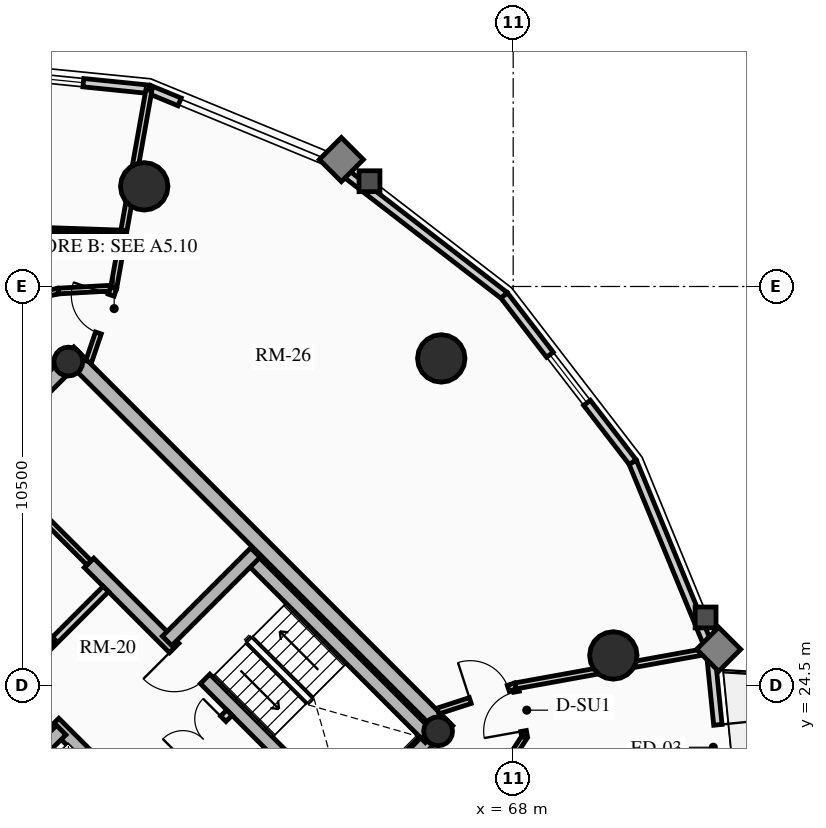
"""IFC4 building model, lengths in metres.
Left out: names, types, materials, properties, quantities, classifications, styles, units other than length and angle.
Written with IfcOpenShell. Run it as: python <this file> out.ifc"""

import sys

from ifc_helpers import new_model, si_unit, direction, frame, frame_2d, origin, origin_2d, place, context, subcontext, project, spatial, rectangle, circle, hollow_circle, extrude, source, transform, mapped, element, fill, save


model = new_model("IFC4")
c1 = context("Model", 3, precision=1e-05, world=origin(), true_north=direction((0.0, 1.0)))
c2 = subcontext(c1, "Body", "Model", "MODEL_VIEW")
j1 = project(units=[si_unit("LENGTHUNIT", "METRE"), si_unit("PLANEANGLEUNIT", "RADIAN")], contexts=[c1])
p1 = place(None, origin())
s1 = spatial("IfcSite", under=j1, at=p1, CompositionType="ELEMENT")
p2 = place(p1, origin())
s2 = spatial("IfcBuilding", under=s1, at=p2, CompositionType="ELEMENT")
p3 = place(p2, frame((0.0, 0.0, 160.33)))
s3 = spatial("IfcBuildingStorey", under=s2, at=p3, CompositionType="ELEMENT", Elevation=160.33)
for number, where, z_axis, x_axis in (
    (1, (58.702, 15.732, 0.0), (0.0, 0.0, 1.0), (-0.707, 0.707, 0.0)),
    (2, (66.268, 23.298, 0.0), (0.0, 0.0, 1.0), (-0.707, 0.707, 0.0)),
):
    element("IfcWall", number, at=place(p3, frame(where, z_axis=z_axis, x_axis=x_axis)), inside=s3, PredefinedType="SHEAR", context=c2, shape_type="SweptSolid", body=[
        extrude(rectangle(XDim=14.1, YDim=0.4, at=frame_2d((7.05, 0.0))), origin(), (0.0, 0.0, 1.0), 2.91),
    ])
p4 = place(p3, frame((58.561, 15.873, 0.0), z_axis=(0.0, 0.0, 1.0), x_axis=(0.707106781187, 0.707106781187, 0.0)))
e3 = element("IfcWall", 3, at=p4, inside=s3, PredefinedType="SHEAR", context=c2, shape_type="SweptSolid", body=[
    extrude(rectangle(XDim=10.7, YDim=0.4, at=frame_2d((5.35, 0.0))), origin(), (0.0, 0.0, 1.0), 2.91),
])
m1 = source(origin(), c2, "Body", "SweptSolid", [
    extrude(rectangle(XDim=1.5, YDim=2.02, at=frame_2d((0.75, 1.01))), frame((0.0, 0.21, 0.0), z_axis=(0.0, -1.0, 0.0), x_axis=(1.0, 0.0, 0.0)), (0.0, 0.0, 1.0), 0.42),
])
p5 = place(p4, frame((5.45, 0.0, 0.0)))
e4 = element("IfcOpeningElement", 4, at=p5, cuts=e3, PredefinedType="OPENING", context=c2, shape_type="MappedRepresentation", body=[
    mapped(m1, transform((0.0, 0.0, 0.0), x_axis=(1.0, 0.0, 0.0), y_axis=(0.0, 1.0, 0.0), z_axis=(0.0, 0.0, 1.0), scale=1.0)),
])
p6 = place(p3, frame((48.873, 25.561, 0.0), z_axis=(0.0, 0.0, 1.0), x_axis=(0.707106781187, 0.707106781187, 0.0)))
e5 = element("IfcWall", 5, at=p6, inside=s3, PredefinedType="SHEAR", context=c2, shape_type="SweptSolid", body=[
    extrude(rectangle(XDim=10.7, YDim=0.4, at=frame_2d((5.35, 0.0))), origin(), (0.0, 0.0, 1.0), 2.91),
])
p7 = place(p6, frame((4.6, 0.0, 0.0)))
e6 = element("IfcOpeningElement", 6, at=p7, cuts=e5, PredefinedType="OPENING", context=c2, shape_type="MappedRepresentation", body=[
    mapped(m1, transform((0.0, 0.0, 0.0), x_axis=(1.0, 0.0, 0.0), y_axis=(0.0, 1.0, 0.0), z_axis=(0.0, 0.0, 1.0), scale=1.0)),
])
p8 = place(p3, frame((61.06, 18.373, 0.0), z_axis=(0.0, 0.0, 1.0), x_axis=(-0.707106781187, 0.707106781187, 0.0)))
e7 = element("IfcWall", 7, at=p8, inside=s3, PredefinedType="SHEAR", context=c2, shape_type="SweptSolid", body=[
    extrude(rectangle(XDim=13.7, YDim=0.35, at=frame_2d((6.85, 0.0))), origin(), (0.0, 0.0, 1.0), 2.91),
])
m2 = source(origin(), c2, "Body", "SweptSolid", [
    extrude(rectangle(XDim=1.1, YDim=2.015, at=frame_2d((0.55, 1.007))), frame((0.0, 0.185, 0.0), z_axis=(0.0, -1.0, 0.0), x_axis=(1.0, 0.0, 0.0)), (0.0, 0.0, 1.0), 0.37),
])
p9 = place(p8, frame((4.85, 0.0, 0.0)))
e8 = element("IfcOpeningElement", 8, at=p9, cuts=e7, PredefinedType="OPENING", context=c2, shape_type="MappedRepresentation", body=[
    mapped(m2, transform((0.0, 0.0, 0.0), x_axis=(1.0, 0.0, 0.0), y_axis=(0.0, 1.0, 0.0), z_axis=(0.0, 0.0, 1.0), scale=1.0)),
])
p10 = place(p8, frame((0.625, 0.0, 0.0)))
e9 = element("IfcOpeningElement", 9, at=p10, cuts=e7, PredefinedType="OPENING", context=c2, shape_type="MappedRepresentation", body=[
    mapped(m2, transform((0.0, 0.0, 0.0), x_axis=(1.0, 0.0, 0.0), y_axis=(0.0, 1.0, 0.0), z_axis=(0.0, 0.0, 1.0), scale=1.0)),
])
p11 = place(p8, frame((2.625, 0.0, 0.0)))
e10 = element("IfcOpeningElement", 10, at=p11, cuts=e7, PredefinedType="OPENING", context=c2, shape_type="MappedRepresentation", body=[
    mapped(m2, transform((0.0, 0.0, 0.0), x_axis=(1.0, 0.0, 0.0), y_axis=(0.0, 1.0, 0.0), z_axis=(0.0, 0.0, 1.0), scale=1.0)),
])
m3 = source(origin(), c2, "Body", "SweptSolid", [
    extrude(rectangle(XDim=1.15, YDim=2.02, at=frame_2d((0.575, 1.01))), frame((0.0, 0.185, 0.0), z_axis=(0.0, -1.0, 0.0), x_axis=(1.0, 0.0, 0.0)), (0.0, 0.0, 1.0), 0.37),
])
p12 = place(p8, frame((7.27, 0.0, 0.0)))
e11 = element("IfcOpeningElement", 11, at=p12, cuts=e7, PredefinedType="OPENING", context=c2, shape_type="MappedRepresentation", body=[
    mapped(m3, transform((0.0, 0.0, 0.0), x_axis=(1.0, 0.0, 0.0), y_axis=(0.0, 1.0, 0.0), z_axis=(0.0, 0.0, 1.0), scale=1.0)),
])
p13 = place(p3, frame((63.627, 20.94, 0.0), z_axis=(0.0, 0.0, 1.0), x_axis=(-0.707119496762, 0.707094065383, 0.0)))
e12 = element("IfcWall", 12, at=p13, inside=s3, PredefinedType="SHEAR", context=c2, shape_type="SweptSolid", body=[
    extrude(rectangle(XDim=9.6, YDim=0.35, at=frame_2d((4.8, 0.0))), origin(), (0.0, 0.0, 1.0), 2.91),
])
p14 = place(p13, frame((5.28, 0.0, 0.0)))
e13 = element("IfcOpeningElement", 13, at=p14, cuts=e12, PredefinedType="OPENING", context=c2, shape_type="MappedRepresentation", body=[
    mapped(m3, transform((0.0, 0.0, 0.0), x_axis=(1.0, 0.0, 0.0), y_axis=(0.0, 1.0, 0.0), z_axis=(0.0, 0.0, 1.0), scale=1.0)),
])
p15 = place(p3, frame((53.784, 21.003, 0.0), z_axis=(0.0, 0.0, 1.0), x_axis=(0.707106781187, 0.707106781187, 0.0)))
e14 = element("IfcWall", 14, at=p15, inside=s3, PredefinedType="SHEAR", context=c2, shape_type="SweptSolid", body=[
    extrude(rectangle(XDim=3.285, YDim=0.35, at=frame_2d((1.643, 0.0))), origin(), (0.0, 0.0, 1.0), 2.91),
])
p16 = place(p3, frame((65.812, 23.125, 0.0), z_axis=(0.0, 0.0, 1.0), x_axis=(-0.707106781187, 0.707106781187, 0.0)))
e15 = element("IfcWall", 15, at=p16, inside=s3, PredefinedType="SHEAR", context=c2, shape_type="SweptSolid", body=[
    extrude(rectangle(XDim=6.695, YDim=0.35, at=frame_2d((3.348, 0.0))), origin(), (0.0, 0.0, 1.0), 2.91),
])
p17 = place(p3, frame((58.893, 25.674, 0.0), z_axis=(0.0, 0.0, 1.0), x_axis=(0.707106781187, 0.707106781187, 0.0)))
e16 = element("IfcWall", 16, at=p17, inside=s3, PredefinedType="SHEAR", context=c2, shape_type="SweptSolid", body=[
    extrude(rectangle(XDim=3.285, YDim=0.35, at=frame_2d((1.643, 0.0))), origin(), (0.0, 0.0, 1.0), 2.91),
])
for number, where, z_axis, x_axis in (
    (17, (66.024, 23.294, 0.0), (0.0, 0.0, 1.0), (0.707, 0.707, 0.0)),
    (18, (56.294, 33.024, 0.0), (0.0, 0.0, 1.0), (0.707, 0.707, 0.0)),
):
    element("IfcColumn", number, at=place(p3, frame(where, z_axis=z_axis, x_axis=x_axis)), inside=s3, PredefinedType="COLUMN", context=c2, shape_type="SweptSolid", body=[
        extrude(hollow_circle(Radius=0.38, WallThickness=0.032, at=origin_2d()), origin(), (0.0, 0.0, 1.0), 2.91),
    ])
for number, where, z_axis, x_axis in (
    (19, (66.107, 33.107, 0.0), (0.0, 0.0, 1.0), (1.0, 0.0, 0.0)),
    (20, (58.291, 37.635, 0.0), (0.0, 0.0, 1.0), (1.0, 0.0, 0.0)),
    (21, (70.635, 25.291, 0.0), (0.0, 0.0, 1.0), (1.0, 0.0, 0.0)),
):
    element("IfcColumn", number, at=place(p3, frame(where, z_axis=z_axis, x_axis=x_axis)), inside=s3, PredefinedType="USERDEFINED", context=c2, shape_type="SweptSolid", body=[
        extrude(circle(Radius=0.625, at=origin_2d()), origin(), (0.0, 0.0, 1.0), 2.91),
    ])
p18 = place(p3, frame((63.378, 38.144, 0.0), z_axis=(0.0, 0.0, 1.0), x_axis=(0.791982658323, -0.610543584779, 0.0)))
e22 = element("IfcWall", 22, at=p18, inside=s3, PredefinedType="SOLIDWALL", context=c2, shape_type="SweptSolid", body=[
    extrude(rectangle(XDim=5.537, YDim=0.22, at=frame_2d((2.769, 0.0))), origin(), (0.0, 0.0, 1.0), 2.245),
])
p19 = place(p3, frame((58.418, 40.189, 0.0), z_axis=(0.0, 0.0, 1.0), x_axis=(0.924556017656, -0.381046152345, 0.0)))
e23 = element("IfcWall", 23, at=p19, inside=s3, PredefinedType="SOLIDWALL", context=c2, shape_type="SweptSolid", body=[
    extrude(rectangle(XDim=0.87, YDim=0.22, at=frame_2d((0.435, 0.0))), origin(), (0.0, 0.0, 1.0), 2.245),
])
p20 = place(p3, frame((53.367, 40.698, 0.0), z_axis=(0.0, 0.0, 1.0), x_axis=(0.994959267396, -0.100279889424, 0.0)))
e24 = element("IfcWall", 24, at=p20, inside=s3, PredefinedType="SOLIDWALL", context=c2, shape_type="SweptSolid", body=[
    extrude(rectangle(XDim=5.076, YDim=0.22, at=frame_2d((2.538, 0.0))), origin(), (0.0, 0.0, 1.0), 2.245),
])
m4 = source(origin(), c2, "Body", "SweptSolid", [
    extrude(rectangle(XDim=1.6, YDim=1.3, at=frame_2d((0.8, 0.65))), frame((0.0, 0.12, 0.0), z_axis=(0.0, -1.0, 0.0), x_axis=(1.0, 0.0, 0.0)), (0.0, 0.0, 1.0), 0.24),
])
p21 = place(p20, frame((1.738, 0.0, 0.65)))
e25 = element("IfcOpeningElement", 25, at=p21, cuts=e24, PredefinedType="OPENING", context=c2, shape_type="MappedRepresentation", body=[
    mapped(m4, transform((0.0, 0.0, 0.0), x_axis=(1.0, 0.0, 0.0), y_axis=(0.0, 1.0, 0.0), z_axis=(0.0, 0.0, 1.0), scale=1.0)),
])
p22 = place(p3, frame((73.189, 25.418, 0.0), z_axis=(0.0, 0.0, 1.0), x_axis=(0.100279889424, -0.994959267396, 0.0)))
e26 = element("IfcWall", 26, at=p22, inside=s3, PredefinedType="SOLIDWALL", context=c2, shape_type="SweptSolid", body=[
    extrude(rectangle(XDim=5.076, YDim=0.22, at=frame_2d((2.538, 0.0))), origin(), (0.0, 0.0, 1.0), 2.245),
])
m5 = source(origin(), c2, "Body", "SweptSolid", [
    extrude(rectangle(XDim=1.15, YDim=2.005, at=frame_2d((0.575, 1.002))), frame((0.0, 0.12, 0.0), z_axis=(0.0, -1.0, 0.0), x_axis=(1.0, 0.0, 0.0)), (0.0, 0.0, 1.0), 0.24),
])
p23 = place(p22, frame((1.963, 0.0, 0.0)))
e27 = element("IfcOpeningElement", 27, at=p23, cuts=e26, PredefinedType="OPENING", context=c2, shape_type="MappedRepresentation", body=[
    mapped(m5, transform((0.0, 0.0, 0.0), x_axis=(1.0, 0.0, 0.0), y_axis=(0.0, 1.0, 0.0), z_axis=(0.0, 0.0, 1.0), scale=1.0)),
])
p24 = place(p3, frame((71.144, 30.378, 0.0), z_axis=(0.0, 0.0, 1.0), x_axis=(0.38111364655, -0.924528197738, 0.0)))
e28 = element("IfcWall", 28, at=p24, inside=s3, PredefinedType="SOLIDWALL", context=c2, shape_type="SweptSolid", body=[
    extrude(rectangle(XDim=5.366, YDim=0.22, at=frame_2d((2.683, 0.0))), origin(), (0.0, 0.0, 1.0), 2.245),
])
p25 = place(p3, frame((67.764, 34.764, 0.0), z_axis=(0.0, 0.0, 1.0), x_axis=(0.610543584779, -0.791982658323, 0.0)))
e29 = element("IfcWall", 29, at=p25, inside=s3, PredefinedType="SOLIDWALL", context=c2, shape_type="SweptSolid", body=[
    extrude(rectangle(XDim=5.537, YDim=0.22, at=frame_2d((2.769, 0.0))), origin(), (0.0, 0.0, 1.0), 2.245),
])
p26 = place(p25, frame((1.968, 0.0, 0.65)))
e30 = element("IfcOpeningElement", 30, at=p26, cuts=e29, PredefinedType="OPENING", context=c2, shape_type="MappedRepresentation", body=[
    mapped(m4, transform((0.0, 0.0, 0.0), x_axis=(1.0, 0.0, 0.0), y_axis=(0.0, 1.0, 0.0), z_axis=(0.0, 0.0, 1.0), scale=1.0)),
])
p27 = place(p3, frame((58.214, 21.467, 0.0), z_axis=(0.0, 0.0, 1.0), x_axis=(0.707106781187, 0.707106781187, 0.0)))
e31 = element("IfcWall", 31, at=p27, inside=s3, PredefinedType="PARTITIONING", context=c2, shape_type="SweptSolid", body=[
    extrude(rectangle(XDim=3.28, YDim=0.2, at=frame_2d((1.64, 0.0))), origin(), (0.0, 0.0, 1.0), 2.675),
])
m6 = source(origin(), c2, "Body", "SweptSolid", [
    extrude(rectangle(XDim=1.5, YDim=2.02, at=frame_2d((0.75, 1.01))), frame((0.0, 0.11, 0.0), z_axis=(0.0, -1.0, 0.0), x_axis=(1.0, 0.0, 0.0)), (0.0, 0.0, 1.0), 0.22),
])
p28 = place(p27, frame((1.55, 0.0, 0.0)))
e32 = element("IfcOpeningElement", 32, at=p28, cuts=e31, PredefinedType="OPENING", context=c2, shape_type="MappedRepresentation", body=[
    mapped(m6, transform((0.0, 0.0, 0.0), x_axis=(1.0, 0.0, 0.0), y_axis=(0.0, 1.0, 0.0), z_axis=(0.0, 0.0, 1.0), scale=1.0)),
])
p29 = place(p3, frame((54.961, 24.719, 0.0), z_axis=(0.0, 0.0, 1.0), x_axis=(0.707106781187, 0.707106781187, 0.0)))
e33 = element("IfcWall", 33, at=p29, inside=s3, PredefinedType="PARTITIONING", context=c2, shape_type="SweptSolid", body=[
    extrude(rectangle(XDim=3.28, YDim=0.2, at=frame_2d((1.64, 0.0))), origin(), (0.0, 0.0, 1.0), 2.675),
])
m7 = source(origin(), c2, "Body", "SweptSolid", [
    extrude(rectangle(XDim=0.9, YDim=2.005, at=frame_2d((0.45, 1.002))), frame((0.0, 0.11, 0.0), z_axis=(0.0, -1.0, 0.0), x_axis=(1.0, 0.0, 0.0)), (0.0, 0.0, 1.0), 0.22),
])
p30 = place(p29, frame((0.16, 0.0, 0.0)))
e34 = element("IfcOpeningElement", 34, at=p30, cuts=e33, PredefinedType="OPENING", context=c2, shape_type="MappedRepresentation", body=[
    mapped(m7, transform((0.0, 0.0, 0.0), x_axis=(1.0, 0.0, 0.0), y_axis=(0.0, 1.0, 0.0), z_axis=(0.0, 0.0, 1.0), scale=1.0)),
])
p31 = place(p3, frame((55.874, 25.631, 0.0), z_axis=(0.0, 0.0, 1.0), x_axis=(-0.707157639372, 0.707055919343, 0.0)))
e35 = element("IfcWall", 35, at=p31, inside=s3, PredefinedType="PARTITIONING", context=c2, shape_type="SweptSolid", body=[
    extrude(rectangle(XDim=2.4, YDim=0.2, at=frame_2d((1.2, 0.0))), origin(), (0.0, 0.0, 1.0), 2.675),
])
p32 = place(p3, frame((56.839, 27.728, 0.0), z_axis=(0.0, 0.0, 1.0), x_axis=(-0.707106781187, 0.707106781187, 0.0)))
e36 = element("IfcWall", 36, at=p32, inside=s3, PredefinedType="PARTITIONING", context=c2, shape_type="SweptSolid", body=[
    extrude(rectangle(XDim=3.9, YDim=0.16, at=frame_2d((1.95, 0.0))), origin(), (0.0, 0.0, 1.0), 2.675),
])
m8 = source(origin(), c2, "Body", "SweptSolid", [
    extrude(rectangle(XDim=0.9, YDim=2.005, at=frame_2d((0.45, 1.002))), frame((0.0, 0.09, 0.0), z_axis=(0.0, -1.0, 0.0), x_axis=(1.0, 0.0, 0.0)), (0.0, 0.0, 1.0), 0.18),
])
p33 = place(p32, frame((2.2, 0.0, 0.0)))
e37 = element("IfcOpeningElement", 37, at=p33, cuts=e36, PredefinedType="OPENING", context=c2, shape_type="MappedRepresentation", body=[
    mapped(m8, transform((0.0, 0.0, 0.0), x_axis=(1.0, 0.0, 0.0), y_axis=(0.0, 1.0, 0.0), z_axis=(0.0, 0.0, 1.0), scale=1.0)),
])
p34 = place(p3, frame((57.486, 34.96, 0.0), z_axis=(0.0, 0.0, 1.0), x_axis=(-0.998483871836, -0.055045051404, 0.0)))
e38 = element("IfcWall", 38, at=p34, inside=s3, PredefinedType="PARTITIONING", context=c2, shape_type="SweptSolid", body=[
    extrude(rectangle(XDim=1.464, YDim=0.15, at=frame_2d((0.732, 0.0))), origin(), (0.0, 0.0, 1.0), 2.245),
])
p35 = place(p3, frame((56.025, 34.88, 0.0), z_axis=(0.0, 0.0, 1.0), x_axis=(-0.975729093394, -0.218981132301, 0.0)))
e39 = element("IfcWall", 39, at=p35, inside=s3, PredefinedType="PARTITIONING", context=c2, shape_type="SweptSolid", body=[
    extrude(rectangle(XDim=1.575, YDim=0.15, at=frame_2d((0.788, 0.0))), origin(), (0.0, 0.0, 1.0), 2.245),
])
p36 = place(p3, frame((67.287, 21.582, 0.0), z_axis=(0.0, 0.0, 1.0), x_axis=(0.543202443884, 0.839601753785, 0.0)))
e40 = element("IfcWall", 40, at=p36, inside=s3, PredefinedType="PARTITIONING", context=c2, shape_type="SweptSolid", body=[
    extrude(rectangle(XDim=1.866, YDim=0.15, at=frame_2d((0.933, 0.0))), origin(), (0.0, 0.0, 1.0), 2.245),
])
p37 = place(p3, frame((68.3, 23.149, 0.0), z_axis=(0.0, 0.0, 1.0), x_axis=(-0.176423554694, 0.984314344785, 0.0)))
e41 = element("IfcWall", 41, at=p37, inside=s3, PredefinedType="PARTITIONING", context=c2, shape_type="SweptSolid", body=[
    extrude(rectangle(XDim=1.362, YDim=0.15, at=frame_2d((0.681, 0.0))), origin(), (0.0, 0.0, 1.0), 2.245),
])
m9 = source(origin(), c2, "Body", "SweptSolid", [
    extrude(rectangle(XDim=1.05, YDim=2.015, at=frame_2d((0.525, 1.007))), frame((0.0, 0.085, 0.0), z_axis=(0.0, -1.0, 0.0), x_axis=(1.0, 0.0, 0.0)), (0.0, 0.0, 1.0), 0.17),
])
p38 = place(p37, frame((0.156, 0.0, 0.0)))
e42 = element("IfcOpeningElement", 42, at=p38, cuts=e41, PredefinedType="OPENING", context=c2, shape_type="MappedRepresentation", body=[
    mapped(m9, transform((0.0, 0.0, 0.0), x_axis=(1.0, 0.0, 0.0), y_axis=(0.0, 1.0, 0.0), z_axis=(0.0, 0.0, 1.0), scale=1.0)),
])
p39 = place(p3, frame((57.486, 34.96, 0.0), z_axis=(0.0, 0.0, 1.0), x_axis=(0.175432895983, 0.984491391027, 0.0)))
e43 = element("IfcWall", 43, at=p39, inside=s3, PredefinedType="PARTITIONING", context=c2, shape_type="SweptSolid", body=[
    extrude(rectangle(XDim=5.291, YDim=0.16, at=frame_2d((2.646, 0.0))), origin(), (0.0, 0.0, 1.0), 2.245),
])
p40 = place(p3, frame((68.06, 24.489, 0.0), z_axis=(0.0, 0.0, 1.0), x_axis=(0.983987798657, 0.178235832802, 0.0)))
e44 = element("IfcWall", 44, at=p40, inside=s3, PredefinedType="PARTITIONING", context=c2, shape_type="SweptSolid", body=[
    extrude(rectangle(XDim=5.193, YDim=0.16, at=frame_2d((2.596, 0.0))), origin(), (0.0, 0.0, 1.0), 2.245),
])
p41 = place(p3, frame((56.828, 33.021, 0.0), z_axis=(0.0, 0.0, 1.0), x_axis=(0.321300161671, 0.94697740528, 0.0)))
e45 = element("IfcWall", 45, at=p41, inside=s3, PredefinedType="PARTITIONING", context=c2, shape_type="SweptSolid", body=[
    extrude(rectangle(XDim=2.049, YDim=0.16, at=frame_2d((1.024, 0.0))), origin(), (0.0, 0.0, 1.0), 2.245),
])
m10 = source(origin(), c2, "Body", "SweptSolid", [
    extrude(rectangle(XDim=1.05, YDim=2.015, at=frame_2d((0.525, 1.007))), frame((0.0, 0.09, 0.0), z_axis=(0.0, -1.0, 0.0), x_axis=(1.0, 0.0, 0.0)), (0.0, 0.0, 1.0), 0.18),
])
p42 = place(p41, frame((0.798, 0.0, 0.0)))
e46 = element("IfcOpeningElement", 46, at=p42, cuts=e45, PredefinedType="OPENING", context=c2, shape_type="MappedRepresentation", body=[
    mapped(m10, transform((0.0, 0.0, 0.0), x_axis=(1.0, 0.0, 0.0), y_axis=(0.0, 1.0, 0.0), z_axis=(0.0, 0.0, 1.0), scale=1.0)),
])
p43 = place(p3, frame((66.021, 23.828, 0.0), z_axis=(0.0, 0.0, 1.0), x_axis=(0.951292345965, 0.308290240695, 0.0)))
e47 = element("IfcWall", 47, at=p43, inside=s3, PredefinedType="PARTITIONING", context=c2, shape_type="SweptSolid", body=[
    extrude(rectangle(XDim=2.144, YDim=0.16, at=frame_2d((1.072, 0.0))), origin(), (0.0, 0.0, 1.0), 2.245),
])
p44 = place(p43, frame((0.894, 0.0, 0.0)))
e48 = element("IfcOpeningElement", 48, at=p44, cuts=e47, PredefinedType="OPENING", context=c2, shape_type="MappedRepresentation", body=[
    mapped(m10, transform((0.0, 0.0, 0.0), x_axis=(1.0, 0.0, 0.0), y_axis=(0.0, 1.0, 0.0), z_axis=(0.0, 0.0, 1.0), scale=1.0)),
])
p45 = place(p3, frame((57.746, 36.419, 0.0), z_axis=(0.0, 0.0, 1.0), x_axis=(-0.999409872703, 0.03434976484, 0.0)))
e49 = element("IfcWall", 49, at=p45, inside=s3, PredefinedType="PARTITIONING", context=c2, shape_type="SweptSolid", body=[
    extrude(rectangle(XDim=2.466, YDim=0.125, at=frame_2d((1.233, 0.0))), origin(), (0.0, 0.0, 1.0), 2.245),
])
m11 = source(origin(), c2, "Body", "SweptSolid", [
    extrude(rectangle(XDim=1.6, YDim=1.3, at=frame_2d((0.8, 0.65))), frame((0.0, 0.03, 0.0), z_axis=(0.0, -1.0, 0.0), x_axis=(1.0, 0.0, 0.0)), (0.0, 0.0, 1.0), 0.06),
])
p46 = place(p21, origin())
e50 = element("IfcWindow", 50, at=p46, inside=s3, PartitioningType="SINGLE_PANEL", PredefinedType="WINDOW", context=c2, shape_type="MappedRepresentation", body=[
    mapped(m11, transform((0.0, 0.0, 0.0), x_axis=(1.0, 0.0, 0.0), y_axis=(0.0, 1.0, 0.0), z_axis=(0.0, 0.0, 1.0), scale=1.0)),
])
fill(e25, e50)
m12 = source(origin(), c2, "Body", "SweptSolid", [
    extrude(rectangle(XDim=1.15, YDim=2.005, at=frame_2d((0.575, 1.002))), frame((0.0, 0.025, 0.0), z_axis=(0.0, -1.0, 0.0), x_axis=(1.0, 0.0, 0.0)), (0.0, 0.0, 1.0), 0.05),
])
p47 = place(p23, origin())
e51 = element("IfcDoor", 51, at=p47, inside=s3, OperationType="SINGLE_SWING_LEFT", PredefinedType="DOOR", context=c2, shape_type="MappedRepresentation", body=[
    mapped(m12, transform((0.0, 0.0, 0.0), x_axis=(1.0, 0.0, 0.0), y_axis=(0.0, 1.0, 0.0), z_axis=(0.0, 0.0, 1.0), scale=1.0)),
])
fill(e27, e51)
p48 = place(p26, origin())
e52 = element("IfcWindow", 52, at=p48, inside=s3, PartitioningType="SINGLE_PANEL", PredefinedType="WINDOW", context=c2, shape_type="MappedRepresentation", body=[
    mapped(m11, transform((0.0, 0.0, 0.0), x_axis=(1.0, 0.0, 0.0), y_axis=(0.0, 1.0, 0.0), z_axis=(0.0, 0.0, 1.0), scale=1.0)),
])
fill(e30, e52)
m13 = source(origin(), c2, "Body", "SweptSolid", [
    extrude(rectangle(XDim=1.15, YDim=2.02, at=frame_2d((0.575, 1.01))), frame((0.0, 0.025, 0.0), z_axis=(0.0, -1.0, 0.0), x_axis=(1.0, 0.0, 0.0)), (0.0, 0.0, 1.0), 0.05),
])
p49 = place(p12, origin())
e53 = element("IfcDoor", 53, at=p49, inside=s3, OperationType="SINGLE_SWING_LEFT", PredefinedType="DOOR", context=c2, shape_type="MappedRepresentation", body=[
    mapped(m13, transform((0.0, 0.0, 0.0), x_axis=(1.0, 0.0, 0.0), y_axis=(0.0, 1.0, 0.0), z_axis=(0.0, 0.0, 1.0), scale=1.0)),
])
fill(e11, e53)
p50 = place(p14, origin())
e54 = element("IfcDoor", 54, at=p50, inside=s3, OperationType="SINGLE_SWING_RIGHT", PredefinedType="DOOR", context=c2, shape_type="MappedRepresentation", body=[
    mapped(m13, transform((0.0, 0.0, 0.0), x_axis=(1.0, 0.0, 0.0), y_axis=(0.0, 1.0, 0.0), z_axis=(0.0, 0.0, 1.0), scale=1.0)),
])
fill(e13, e54)
m14 = source(origin(), c2, "Body", "SweptSolid", [
    extrude(rectangle(XDim=1.5, YDim=2.02, at=frame_2d((0.75, 1.01))), frame((0.0, 0.025, 0.0), z_axis=(0.0, -1.0, 0.0), x_axis=(1.0, 0.0, 0.0)), (0.0, 0.0, 1.0), 0.05),
])
p51 = place(p28, origin())
e55 = element("IfcDoor", 55, at=p51, inside=s3, OperationType="DOUBLE_DOOR_SINGLE_SWING", PredefinedType="DOOR", context=c2, shape_type="MappedRepresentation", body=[
    mapped(m14, transform((0.0, 0.0, 0.0), x_axis=(1.0, 0.0, 0.0), y_axis=(0.0, 1.0, 0.0), z_axis=(0.0, 0.0, 1.0), scale=1.0)),
])
fill(e32, e55)
m15 = source(origin(), c2, "Body", "SweptSolid", [
    extrude(rectangle(XDim=1.05, YDim=2.015, at=frame_2d((0.525, 1.007))), frame((0.0, 0.025, 0.0), z_axis=(0.0, -1.0, 0.0), x_axis=(1.0, 0.0, 0.0)), (0.0, 0.0, 1.0), 0.05),
])
p52 = place(p42, origin())
e56 = element("IfcDoor", 56, at=p52, inside=s3, OperationType="SINGLE_SWING_RIGHT", PredefinedType="DOOR", context=c2, shape_type="MappedRepresentation", body=[
    mapped(m15, transform((0.0, 0.0, 0.0), x_axis=(1.0, 0.0, 0.0), y_axis=(0.0, 1.0, 0.0), z_axis=(0.0, 0.0, 1.0), scale=1.0)),
])
fill(e46, e56)
p53 = place(p44, origin())
e57 = element("IfcDoor", 57, at=p53, inside=s3, OperationType="SINGLE_SWING_LEFT", PredefinedType="DOOR", context=c2, shape_type="MappedRepresentation", body=[
    mapped(m15, transform((0.0, 0.0, 0.0), x_axis=(1.0, 0.0, 0.0), y_axis=(0.0, 1.0, 0.0), z_axis=(0.0, 0.0, 1.0), scale=1.0)),
])
fill(e48, e57)
p54 = place(p38, origin())
e58 = element("IfcDoor", 58, at=p54, inside=s3, OperationType="SINGLE_SWING_LEFT", PredefinedType="DOOR", context=c2, shape_type="MappedRepresentation", body=[
    mapped(m15, transform((0.0, 0.0, 0.0), x_axis=(1.0, 0.0, 0.0), y_axis=(0.0, 1.0, 0.0), z_axis=(0.0, 0.0, 1.0), scale=1.0)),
])
fill(e42, e58)
save(model, sys.argv[1])
